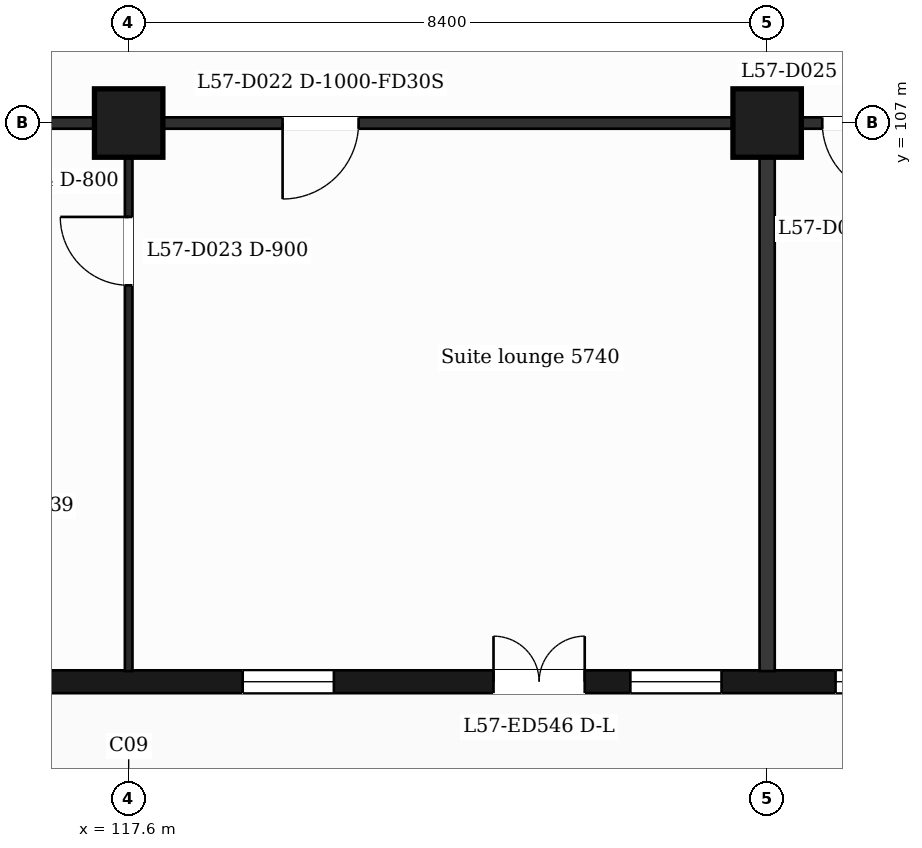
"""IFC4 building model, lengths in metres.
Left out: names, types, materials, properties, quantities, classifications, styles, units other than length and angle.
Written with IfcOpenShell. Run it as: python <this file> out.ifc"""

import sys

from ifc_helpers import new_model, si_unit, direction, frame, frame_2d, origin, origin_2d, place, context, subcontext, project, spatial, rectangle, extrude, element, fill, save


model = new_model("IFC4")
c1 = context("Model", 3, precision=1e-05, world=origin(), true_north=direction((0.0, 1.0)))
c2 = subcontext(c1, "Body", "Model", "MODEL_VIEW")
j1 = project(units=[si_unit("LENGTHUNIT", "METRE"), si_unit("PLANEANGLEUNIT", "RADIAN")], contexts=[c1])
p1 = place(None, origin())
s1 = spatial("IfcSite", under=j1, at=p1, CompositionType="ELEMENT")
p2 = place(p1, origin())
s2 = spatial("IfcBuilding", under=s1, at=p2, CompositionType="ELEMENT")
p3 = place(p2, frame((0.0, 0.0, 235.5)))
s3 = spatial("IfcBuildingStorey", under=s2, at=p3, CompositionType="ELEMENT", Elevation=235.5)
for number, where, z_axis, x_axis in (
    (1, (117.6, 107.0, 0.0), (0.0, 0.0, 1.0), (1.0, 0.0, 0.0)),
    (2, (126.0, 107.0, 0.0), (0.0, 0.0, 1.0), (1.0, 0.0, 0.0)),
):
    element("IfcColumn", number, at=place(p3, frame(where, z_axis=z_axis, x_axis=x_axis)), inside=s3, PredefinedType="COLUMN", context=c2, shape_type="SweptSolid", body=[
        extrude(rectangle(XDim=0.9, YDim=0.9, at=origin_2d()), origin(), (0.0, 0.0, 1.0), 3.7),
    ])
p4 = place(p3, frame((89.85, 99.65, 0.0), z_axis=(0.0, 0.0, 1.0), x_axis=(1.0, 0.0, 0.0)))
e3 = element("IfcWall", 3, at=p4, inside=s3, PredefinedType="SOLIDWALL", context=c2, shape_type="SweptSolid", body=[
    extrude(rectangle(XDim=47.25, YDim=0.3, at=frame_2d((23.625, 0.0))), origin(), (0.0, 0.0, 1.0), 3.38),
])
p5 = place(p4, frame((0.725, 0.0, 0.9)))
e4 = element("IfcOpeningElement", 4, at=p5, cuts=e3, PredefinedType="OPENING", context=c2, shape_type="SweptSolid", body=[
    extrude(rectangle(XDim=1.2, YDim=2.1, at=frame_2d((0.6, 1.05))), frame((0.0, 0.16, 0.0), z_axis=(0.0, -1.0, 0.0), x_axis=(1.0, 0.0, 0.0)), (0.0, 0.0, 1.0), 0.32),
])
p6 = place(p4, frame((3.45, 0.0, 0.9)))
e5 = element("IfcOpeningElement", 5, at=p6, cuts=e3, PredefinedType="OPENING", context=c2, shape_type="SweptSolid", body=[
    extrude(rectangle(XDim=2.4, YDim=2.1, at=frame_2d((1.2, 1.05))), frame((0.0, 0.16, 0.0), z_axis=(0.0, -1.0, 0.0), x_axis=(1.0, 0.0, 0.0)), (0.0, 0.0, 1.0), 0.32),
])
p7 = place(p4, frame((7.65, 0.0, 0.9)))
e6 = element("IfcOpeningElement", 6, at=p7, cuts=e3, PredefinedType="OPENING", context=c2, shape_type="SweptSolid", body=[
    extrude(rectangle(XDim=2.4, YDim=2.1, at=frame_2d((1.2, 1.05))), frame((0.0, 0.16, 0.0), z_axis=(0.0, -1.0, 0.0), x_axis=(1.0, 0.0, 0.0)), (0.0, 0.0, 1.0), 0.32),
])
p8 = place(p4, frame((11.85, 0.0, 0.9)))
e7 = element("IfcOpeningElement", 7, at=p8, cuts=e3, PredefinedType="OPENING", context=c2, shape_type="SweptSolid", body=[
    extrude(rectangle(XDim=2.4, YDim=2.1, at=frame_2d((1.2, 1.05))), frame((0.0, 0.16, 0.0), z_axis=(0.0, -1.0, 0.0), x_axis=(1.0, 0.0, 0.0)), (0.0, 0.0, 1.0), 0.32),
])
p9 = place(p4, frame((16.05, 0.0, 0.9)))
e8 = element("IfcOpeningElement", 8, at=p9, cuts=e3, PredefinedType="OPENING", context=c2, shape_type="SweptSolid", body=[
    extrude(rectangle(XDim=2.4, YDim=2.1, at=frame_2d((1.2, 1.05))), frame((0.0, 0.16, 0.0), z_axis=(0.0, -1.0, 0.0), x_axis=(1.0, 0.0, 0.0)), (0.0, 0.0, 1.0), 0.32),
])
p10 = place(p4, frame((20.25, 0.0, 0.9)))
e9 = element("IfcOpeningElement", 9, at=p10, cuts=e3, PredefinedType="OPENING", context=c2, shape_type="SweptSolid", body=[
    extrude(rectangle(XDim=2.4, YDim=2.1, at=frame_2d((1.2, 1.05))), frame((0.0, 0.16, 0.0), z_axis=(0.0, -1.0, 0.0), x_axis=(1.0, 0.0, 0.0)), (0.0, 0.0, 1.0), 0.32),
])
p11 = place(p4, frame((25.05, 0.0, 0.9)))
e10 = element("IfcOpeningElement", 10, at=p11, cuts=e3, PredefinedType="OPENING", context=c2, shape_type="SweptSolid", body=[
    extrude(rectangle(XDim=1.2, YDim=2.1, at=frame_2d((0.6, 1.05))), frame((0.0, 0.16, 0.0), z_axis=(0.0, -1.0, 0.0), x_axis=(1.0, 0.0, 0.0)), (0.0, 0.0, 1.0), 0.32),
])
p12 = place(p4, frame((29.25, 0.0, 0.9)))
e11 = element("IfcOpeningElement", 11, at=p12, cuts=e3, PredefinedType="OPENING", context=c2, shape_type="SweptSolid", body=[
    extrude(rectangle(XDim=1.2, YDim=2.1, at=frame_2d((0.6, 1.05))), frame((0.0, 0.16, 0.0), z_axis=(0.0, -1.0, 0.0), x_axis=(1.0, 0.0, 0.0)), (0.0, 0.0, 1.0), 0.32),
])
p13 = place(p4, frame((32.55, 0.0, 0.0)))
e12 = element("IfcOpeningElement", 12, at=p13, cuts=e3, PredefinedType="OPENING", context=c2, shape_type="SweptSolid", body=[
    extrude(rectangle(XDim=1.2, YDim=2.4, at=frame_2d((0.6, 1.2))), frame((0.0, 0.16, 0.0), z_axis=(0.0, -1.0, 0.0), x_axis=(1.0, 0.0, 0.0)), (0.0, 0.0, 1.0), 0.32),
])
p14 = place(p4, frame((34.35, 0.0, 0.9)))
e13 = element("IfcOpeningElement", 13, at=p14, cuts=e3, PredefinedType="OPENING", context=c2, shape_type="SweptSolid", body=[
    extrude(rectangle(XDim=1.2, YDim=2.1, at=frame_2d((0.6, 1.05))), frame((0.0, 0.16, 0.0), z_axis=(0.0, -1.0, 0.0), x_axis=(1.0, 0.0, 0.0)), (0.0, 0.0, 1.0), 0.32),
])
p15 = place(p4, frame((37.05, 0.0, 0.9)))
e14 = element("IfcOpeningElement", 14, at=p15, cuts=e3, PredefinedType="OPENING", context=c2, shape_type="SweptSolid", body=[
    extrude(rectangle(XDim=2.4, YDim=2.1, at=frame_2d((1.2, 1.05))), frame((0.0, 0.16, 0.0), z_axis=(0.0, -1.0, 0.0), x_axis=(1.0, 0.0, 0.0)), (0.0, 0.0, 1.0), 0.32),
])
p16 = place(p4, frame((40.95, 0.0, 0.0)))
e15 = element("IfcOpeningElement", 15, at=p16, cuts=e3, PredefinedType="OPENING", context=c2, shape_type="SweptSolid", body=[
    extrude(rectangle(XDim=1.2, YDim=2.4, at=frame_2d((0.6, 1.2))), frame((0.0, 0.16, 0.0), z_axis=(0.0, -1.0, 0.0), x_axis=(1.0, 0.0, 0.0)), (0.0, 0.0, 1.0), 0.32),
])
p17 = place(p4, frame((42.75, 0.0, 0.9)))
e16 = element("IfcOpeningElement", 16, at=p17, cuts=e3, PredefinedType="OPENING", context=c2, shape_type="SweptSolid", body=[
    extrude(rectangle(XDim=1.2, YDim=2.1, at=frame_2d((0.6, 1.05))), frame((0.0, 0.16, 0.0), z_axis=(0.0, -1.0, 0.0), x_axis=(1.0, 0.0, 0.0)), (0.0, 0.0, 1.0), 0.32),
])
p18 = place(p4, frame((45.25, 0.0, 0.9)))
e17 = element("IfcOpeningElement", 17, at=p18, cuts=e3, PredefinedType="OPENING", context=c2, shape_type="SweptSolid", body=[
    extrude(rectangle(XDim=1.2, YDim=2.1, at=frame_2d((0.6, 1.05))), frame((0.0, 0.16, 0.0), z_axis=(0.0, -1.0, 0.0), x_axis=(1.0, 0.0, 0.0)), (0.0, 0.0, 1.0), 0.32),
])
p19 = place(p3, frame((87.018, 107.0, 0.0), z_axis=(0.0, 0.0, 1.0), x_axis=(1.0, 0.0, 0.0)))
e18 = element("IfcWall", 18, at=p19, inside=s3, PredefinedType="PARTITIONING", context=c2, shape_type="SweptSolid", body=[
    extrude(rectangle(XDim=52.765, YDim=0.15, at=frame_2d((26.382, 0.0))), origin(), (0.0, 0.0, 1.0), 3.38),
])
p20 = place(p19, frame((0.707, 0.0, 0.0)))
e19 = element("IfcOpeningElement", 19, at=p20, cuts=e18, PredefinedType="OPENING", context=c2, shape_type="SweptSolid", body=[
    extrude(rectangle(XDim=0.95, YDim=2.1, at=frame_2d((0.475, 1.05))), frame((0.0, 0.085, 0.0), z_axis=(0.0, -1.0, 0.0), x_axis=(1.0, 0.0, 0.0)), (0.0, 0.0, 1.0), 0.17),
])
p21 = place(p19, frame((8.412, 0.0, 0.0)))
e20 = element("IfcOpeningElement", 20, at=p21, cuts=e18, PredefinedType="OPENING", context=c2, shape_type="SweptSolid", body=[
    extrude(rectangle(XDim=1.0, YDim=2.1, at=frame_2d((0.5, 1.05))), frame((0.0, 0.085, 0.0), z_axis=(0.0, -1.0, 0.0), x_axis=(1.0, 0.0, 0.0)), (0.0, 0.0, 1.0), 0.17),
])
p22 = place(p19, frame((20.482, 0.0, 0.0)))
e21 = element("IfcOpeningElement", 21, at=p22, cuts=e18, PredefinedType="OPENING", context=c2, shape_type="SweptSolid", body=[
    extrude(rectangle(XDim=1.0, YDim=2.1, at=frame_2d((0.5, 1.05))), frame((0.0, 0.085, 0.0), z_axis=(0.0, -1.0, 0.0), x_axis=(1.0, 0.0, 0.0)), (0.0, 0.0, 1.0), 0.17),
])
p23 = place(p19, frame((22.882, 0.0, 0.0)))
e22 = element("IfcOpeningElement", 22, at=p23, cuts=e18, PredefinedType="OPENING", context=c2, shape_type="SweptSolid", body=[
    extrude(rectangle(XDim=1.0, YDim=2.1, at=frame_2d((0.5, 1.05))), frame((0.0, 0.085, 0.0), z_axis=(0.0, -1.0, 0.0), x_axis=(1.0, 0.0, 0.0)), (0.0, 0.0, 1.0), 0.17),
])
p24 = place(p19, frame((32.607, 0.0, 0.0)))
e23 = element("IfcOpeningElement", 23, at=p24, cuts=e18, PredefinedType="OPENING", context=c2, shape_type="SweptSolid", body=[
    extrude(rectangle(XDim=1.0, YDim=2.1, at=frame_2d((0.5, 1.05))), frame((0.0, 0.085, 0.0), z_axis=(0.0, -1.0, 0.0), x_axis=(1.0, 0.0, 0.0)), (0.0, 0.0, 1.0), 0.17),
])
p25 = place(p19, frame((39.707, 0.0, 0.0)))
e24 = element("IfcOpeningElement", 24, at=p25, cuts=e18, PredefinedType="OPENING", context=c2, shape_type="SweptSolid", body=[
    extrude(rectangle(XDim=0.95, YDim=2.1, at=frame_2d((0.475, 1.05))), frame((0.0, 0.085, 0.0), z_axis=(0.0, -1.0, 0.0), x_axis=(1.0, 0.0, 0.0)), (0.0, 0.0, 1.0), 0.17),
])
p26 = place(p19, frame((43.457, 0.0, 0.0)))
e25 = element("IfcOpeningElement", 25, at=p26, cuts=e18, PredefinedType="OPENING", context=c2, shape_type="SweptSolid", body=[
    extrude(rectangle(XDim=0.95, YDim=2.1, at=frame_2d((0.475, 1.05))), frame((0.0, 0.085, 0.0), z_axis=(0.0, -1.0, 0.0), x_axis=(1.0, 0.0, 0.0)), (0.0, 0.0, 1.0), 0.17),
])
p27 = place(p19, frame((49.285, 0.0, 0.0)))
e26 = element("IfcOpeningElement", 26, at=p27, cuts=e18, PredefinedType="OPENING", context=c2, shape_type="SweptSolid", body=[
    extrude(rectangle(XDim=0.95, YDim=2.1, at=frame_2d((0.475, 1.05))), frame((0.0, 0.085, 0.0), z_axis=(0.0, -1.0, 0.0), x_axis=(1.0, 0.0, 0.0)), (0.0, 0.0, 1.0), 0.17),
])
p28 = place(p3, frame((117.6, 99.79, 0.0), z_axis=(0.0, 0.0, 1.0), x_axis=(0.0, 1.0, 0.0)))
e27 = element("IfcWall", 27, at=p28, inside=s3, PredefinedType="PARTITIONING", context=c2, shape_type="SweptSolid", body=[
    extrude(rectangle(XDim=7.135, YDim=0.1, at=frame_2d((3.567, 0.0))), origin(), (0.0, 0.0, 1.0), 3.38),
])
p29 = place(p28, frame((5.075, 0.0, 0.0)))
e28 = element("IfcOpeningElement", 28, at=p29, cuts=e27, PredefinedType="OPENING", context=c2, shape_type="SweptSolid", body=[
    extrude(rectangle(XDim=0.9, YDim=2.1, at=frame_2d((0.45, 1.05))), frame((0.0, 0.06, 0.0), z_axis=(0.0, -1.0, 0.0), x_axis=(1.0, 0.0, 0.0)), (0.0, 0.0, 1.0), 0.12),
])
p30 = place(p3, frame((126.0, 99.79, 0.0), z_axis=(0.0, 0.0, 1.0), x_axis=(0.0, 1.0, 0.0)))
e29 = element("IfcWall", 29, at=p30, inside=s3, PredefinedType="PARTITIONING", context=c2, shape_type="SweptSolid", body=[
    extrude(rectangle(XDim=7.135, YDim=0.2, at=frame_2d((3.567, 0.0))), origin(), (0.0, 0.0, 1.0), 3.38),
])
p31 = place(p12, origin())
e30 = element("IfcWindow", 30, at=p31, inside=s3, PartitioningType="SINGLE_PANEL", PredefinedType="WINDOW", context=c2, shape_type="SweptSolid", body=[
    extrude(rectangle(XDim=1.2, YDim=2.1, at=frame_2d((0.6, 1.05))), frame((0.0, 0.03, 0.0), z_axis=(0.0, -1.0, 0.0), x_axis=(1.0, 0.0, 0.0)), (0.0, 0.0, 1.0), 0.06),
])
fill(e11, e30)
p32 = place(p13, origin())
e31 = element("IfcDoor", 31, at=p32, inside=s3, OperationType="DOUBLE_DOOR_SINGLE_SWING", PredefinedType="DOOR", context=c2, shape_type="SweptSolid", body=[
    extrude(rectangle(XDim=1.2, YDim=2.4, at=frame_2d((0.6, 1.2))), frame((0.0, 0.025, 0.0), z_axis=(0.0, -1.0, 0.0), x_axis=(1.0, 0.0, 0.0)), (0.0, 0.0, 1.0), 0.05),
])
fill(e12, e31)
p33 = place(p14, origin())
e32 = element("IfcWindow", 32, at=p33, inside=s3, PartitioningType="SINGLE_PANEL", PredefinedType="WINDOW", context=c2, shape_type="SweptSolid", body=[
    extrude(rectangle(XDim=1.2, YDim=2.1, at=frame_2d((0.6, 1.05))), frame((0.0, 0.03, 0.0), z_axis=(0.0, -1.0, 0.0), x_axis=(1.0, 0.0, 0.0)), (0.0, 0.0, 1.0), 0.06),
])
fill(e13, e32)
p34 = place(p15, origin())
e33 = element("IfcWindow", 33, at=p34, inside=s3, PartitioningType="SINGLE_PANEL", PredefinedType="WINDOW", context=c2, shape_type="SweptSolid", body=[
    extrude(rectangle(XDim=2.4, YDim=2.1, at=frame_2d((1.2, 1.05))), frame((0.0, 0.03, 0.0), z_axis=(0.0, -1.0, 0.0), x_axis=(1.0, 0.0, 0.0)), (0.0, 0.0, 1.0), 0.06),
])
fill(e14, e33)
p35 = place(p24, origin())
e34 = element("IfcDoor", 34, at=p35, inside=s3, OperationType="SINGLE_SWING_LEFT", PredefinedType="DOOR", context=c2, shape_type="SweptSolid", body=[
    extrude(rectangle(XDim=1.0, YDim=2.1, at=frame_2d((0.5, 1.05))), frame((0.0, 0.025, 0.0), z_axis=(0.0, -1.0, 0.0), x_axis=(1.0, 0.0, 0.0)), (0.0, 0.0, 1.0), 0.05),
])
fill(e23, e34)
p36 = place(p29, origin())
e35 = element("IfcDoor", 35, at=p36, inside=s3, OperationType="SINGLE_SWING_RIGHT", PredefinedType="DOOR", context=c2, shape_type="SweptSolid", body=[
    extrude(rectangle(XDim=0.9, YDim=2.1, at=frame_2d((0.45, 1.05))), frame((0.0, 0.025, 0.0), z_axis=(0.0, -1.0, 0.0), x_axis=(1.0, 0.0, 0.0)), (0.0, 0.0, 1.0), 0.05),
])
fill(e28, e35)
p37 = place(p25, origin())
e36 = element("IfcDoor", 36, at=p37, inside=s3, OperationType="SINGLE_SWING_RIGHT", PredefinedType="DOOR", context=c2, shape_type="SweptSolid", body=[
    extrude(rectangle(XDim=0.95, YDim=2.1, at=frame_2d((0.475, 1.05))), frame((0.0, 0.025, 0.0), z_axis=(0.0, -1.0, 0.0), x_axis=(1.0, 0.0, 0.0)), (0.0, 0.0, 1.0), 0.05),
])
fill(e24, e36)
save(model, sys.argv[1])
